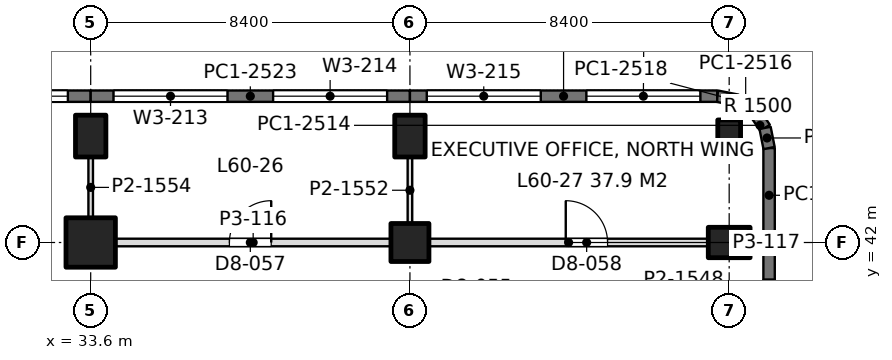
"""IFC4 building model, lengths in metres.
Left out: names, types, materials, properties, quantities, classifications, styles, units other than length and angle.
Written with IfcOpenShell. Run it as: python <this file> out.ifc"""

import sys

from ifc_helpers import new_model, si_unit, direction, frame, frame_2d, origin, origin_2d, place, context, subcontext, project, spatial, rectangle, extrude, element, fill, save


model = new_model("IFC4")
c1 = context("Model", 3, precision=1e-05, world=origin(), true_north=direction((0.0, 1.0)))
c2 = subcontext(c1, "Body", "Model", "MODEL_VIEW")
j1 = project(units=[si_unit("LENGTHUNIT", "METRE"), si_unit("PLANEANGLEUNIT", "RADIAN")], contexts=[c1])
p1 = place(None, origin())
s1 = spatial("IfcSite", under=j1, at=p1, CompositionType="ELEMENT")
p2 = place(p1, origin())
s2 = spatial("IfcBuilding", under=s1, at=p2, CompositionType="ELEMENT")
p3 = place(p2, frame((0.0, 0.0, 263.7)))
s3 = spatial("IfcBuildingStorey", under=s2, at=p3, CompositionType="ELEMENT", Elevation=263.7)
p4 = place(p3, frame((33.6, 42.0, 0.0), z_axis=(0.0, 0.0, 1.0), x_axis=(1.0, 0.0, 0.0)))
e1 = element("IfcColumn", 1, at=p4, inside=s3, PredefinedType="COLUMN", context=c2, shape_type="SweptSolid", body=[
    extrude(rectangle(XDim=1.3, YDim=1.3, at=origin_2d()), origin(), (0.0, 0.0, 1.0), 4.5),
])
p5 = place(p3, frame((33.6, 44.8, 0.0), z_axis=(0.0, 0.0, 1.0), x_axis=(1.0, 0.0, 0.0)))
e2 = element("IfcColumn", 2, at=p5, inside=s3, PredefinedType="COLUMN", context=c2, shape_type="SweptSolid", body=[
    extrude(rectangle(XDim=0.8, YDim=1.1, at=origin_2d()), origin(), (0.0, 0.0, 1.0), 4.5),
])
p6 = place(p3, frame((42.0, 42.0, 0.0), z_axis=(0.0, 0.0, 1.0), x_axis=(1.0, 0.0, 0.0)))
e3 = element("IfcColumn", 3, at=p6, inside=s3, PredefinedType="COLUMN", context=c2, shape_type="SweptSolid", body=[
    extrude(rectangle(XDim=1.0, YDim=1.0, at=origin_2d()), origin(), (0.0, 0.0, 1.0), 4.5),
])
for number, where, z_axis, x_axis in (
    (4, (42.0, 44.8, 0.0), (0.0, 0.0, 1.0), (1.0, 0.0, 0.0)),
    (5, (50.4, 42.0, 0.0), (0.0, 0.0, 1.0), (0.0, 1.0, 0.0)),
):
    element("IfcColumn", number, at=place(p3, frame(where, z_axis=z_axis, x_axis=x_axis)), inside=s3, PredefinedType="COLUMN", context=c2, shape_type="SweptSolid", body=[
        extrude(rectangle(XDim=0.8, YDim=1.1, at=origin_2d()), origin(), (0.0, 0.0, 1.0), 4.5),
    ])
p7 = place(p3, frame((50.4, 44.8, 0.0), z_axis=(0.0, 0.0, 1.0), x_axis=(1.0, 0.0, 0.0)))
e6 = element("IfcColumn", 6, at=p7, inside=s3, PredefinedType="COLUMN", context=c2, shape_type="SweptSolid", body=[
    extrude(rectangle(XDim=0.6, YDim=0.85, at=origin_2d()), origin(), (0.0, 0.0, 1.0), 4.5),
])
p8 = place(p3, frame((25.2, 45.85, 0.0), z_axis=(0.0, 0.0, 1.0), x_axis=(1.0, 0.0, 0.0)))
e7 = element("IfcWall", 7, at=p8, inside=s3, PredefinedType="SOLIDWALL", context=c2, shape_type="SweptSolid", body=[
    extrude(rectangle(XDim=8.4, YDim=0.3, at=frame_2d((4.2, 0.0))), origin(), (0.0, 0.0, 1.0), 4.35),
])
p9 = place(p8, frame((0.6, 0.0, 0.9)))
e8 = element("IfcOpeningElement", 8, at=p9, cuts=e7, PredefinedType="OPENING", context=c2, shape_type="SweptSolid", body=[
    extrude(rectangle(XDim=3.0, YDim=2.4, at=frame_2d((1.5, 1.2))), frame((0.0, 0.16, 0.0), z_axis=(0.0, -1.0, 0.0), x_axis=(1.0, 0.0, 0.0)), (0.0, 0.0, 1.0), 0.32),
])
p10 = place(p8, frame((4.8, 0.0, 0.9)))
e9 = element("IfcOpeningElement", 9, at=p10, cuts=e7, PredefinedType="OPENING", context=c2, shape_type="SweptSolid", body=[
    extrude(rectangle(XDim=3.0, YDim=2.4, at=frame_2d((1.5, 1.2))), frame((0.0, 0.16, 0.0), z_axis=(0.0, -1.0, 0.0), x_axis=(1.0, 0.0, 0.0)), (0.0, 0.0, 1.0), 0.32),
])
p11 = place(p3, frame((33.6, 45.85, 0.0), z_axis=(0.0, 0.0, 1.0), x_axis=(1.0, 0.0, 0.0)))
e10 = element("IfcWall", 10, at=p11, inside=s3, PredefinedType="SOLIDWALL", context=c2, shape_type="SweptSolid", body=[
    extrude(rectangle(XDim=8.4, YDim=0.3, at=frame_2d((4.2, 0.0))), origin(), (0.0, 0.0, 1.0), 4.35),
])
p12 = place(p11, frame((0.6, 0.0, 0.9)))
e11 = element("IfcOpeningElement", 11, at=p12, cuts=e10, PredefinedType="OPENING", context=c2, shape_type="SweptSolid", body=[
    extrude(rectangle(XDim=3.0, YDim=2.4, at=frame_2d((1.5, 1.2))), frame((0.0, 0.16, 0.0), z_axis=(0.0, -1.0, 0.0), x_axis=(1.0, 0.0, 0.0)), (0.0, 0.0, 1.0), 0.32),
])
p13 = place(p11, frame((4.8, 0.0, 0.9)))
e12 = element("IfcOpeningElement", 12, at=p13, cuts=e10, PredefinedType="OPENING", context=c2, shape_type="SweptSolid", body=[
    extrude(rectangle(XDim=3.0, YDim=2.4, at=frame_2d((1.5, 1.2))), frame((0.0, 0.16, 0.0), z_axis=(0.0, -1.0, 0.0), x_axis=(1.0, 0.0, 0.0)), (0.0, 0.0, 1.0), 0.32),
])
p14 = place(p3, frame((42.0, 45.85, 0.0), z_axis=(0.0, 0.0, 1.0), x_axis=(1.0, 0.0, 0.0)))
e13 = element("IfcWall", 13, at=p14, inside=s3, PredefinedType="SOLIDWALL", context=c2, shape_type="SweptSolid", body=[
    extrude(rectangle(XDim=8.085, YDim=0.3, at=frame_2d((4.042, 0.0))), origin(), (0.0, 0.0, 1.0), 4.35),
])
p15 = place(p14, frame((0.443, 0.0, 0.9)))
e14 = element("IfcOpeningElement", 14, at=p15, cuts=e13, PredefinedType="OPENING", context=c2, shape_type="SweptSolid", body=[
    extrude(rectangle(XDim=3.0, YDim=2.4, at=frame_2d((1.5, 1.2))), frame((0.0, 0.16, 0.0), z_axis=(0.0, -1.0, 0.0), x_axis=(1.0, 0.0, 0.0)), (0.0, 0.0, 1.0), 0.32),
])
p16 = place(p14, frame((4.643, 0.0, 0.9)))
e15 = element("IfcOpeningElement", 15, at=p16, cuts=e13, PredefinedType="OPENING", context=c2, shape_type="SweptSolid", body=[
    extrude(rectangle(XDim=3.0, YDim=2.4, at=frame_2d((1.5, 1.2))), frame((0.0, 0.16, 0.0), z_axis=(0.0, -1.0, 0.0), x_axis=(1.0, 0.0, 0.0)), (0.0, 0.0, 1.0), 0.32),
])
p17 = place(p3, frame((50.085, 45.85, 0.0), z_axis=(0.0, 0.0, 1.0), x_axis=(0.980702050465, -0.1955082817, 0.0)))
e16 = element("IfcWall", 16, at=p17, inside=s3, PredefinedType="SOLIDWALL", context=c2, shape_type="SweptSolid", body=[
    extrude(rectangle(XDim=0.541, YDim=0.3, at=frame_2d((0.271, 0.0))), origin(), (0.0, 0.0, 1.0), 4.35),
])
p18 = place(p3, frame((50.615, 45.744, 0.0), z_axis=(0.0, 0.0, 1.0), x_axis=(0.831692711774, -0.555236195849, 0.0)))
e17 = element("IfcWall", 17, at=p18, inside=s3, PredefinedType="SOLIDWALL", context=c2, shape_type="SweptSolid", body=[
    extrude(rectangle(XDim=0.525, YDim=0.3, at=frame_2d((0.263, 0.0))), origin(), (0.0, 0.0, 1.0), 4.35),
])
p19 = place(p3, frame((51.052, 45.453, 0.0), z_axis=(0.0, 0.0, 1.0), x_axis=(0.55534295404, -0.831621430339, 0.0)))
e18 = element("IfcWall", 18, at=p19, inside=s3, PredefinedType="SOLIDWALL", context=c2, shape_type="SweptSolid", body=[
    extrude(rectangle(XDim=0.526, YDim=0.3, at=frame_2d((0.263, 0.0))), origin(), (0.0, 0.0, 1.0), 4.35),
])
p20 = place(p3, frame((51.344, 45.015, 0.0), z_axis=(0.0, 0.0, 1.0), x_axis=(0.195073962632, -0.980788534345, 0.0)))
e19 = element("IfcWall", 19, at=p20, inside=s3, PredefinedType="SOLIDWALL", context=c2, shape_type="SweptSolid", body=[
    extrude(rectangle(XDim=0.541, YDim=0.3, at=frame_2d((0.271, 0.0))), origin(), (0.0, 0.0, 1.0), 4.35),
])
p21 = place(p3, frame((51.45, 44.485, 0.0), z_axis=(0.0, 0.0, 1.0), x_axis=(0.0, -1.0, 0.0)))
e20 = element("IfcWall", 20, at=p21, inside=s3, PredefinedType="SOLIDWALL", context=c2, shape_type="SweptSolid", body=[
    extrude(rectangle(XDim=2.485, YDim=0.3, at=frame_2d((1.243, 0.0))), origin(), (0.0, 0.0, 1.0), 4.35),
])
p22 = place(p3, frame((51.45, 42.0, 0.0), z_axis=(0.0, 0.0, 1.0), x_axis=(0.0, -1.0, 0.0)))
e21 = element("IfcWall", 21, at=p22, inside=s3, PredefinedType="SOLIDWALL", context=c2, shape_type="SweptSolid", body=[
    extrude(rectangle(XDim=4.35, YDim=0.3, at=frame_2d((2.175, 0.0))), origin(), (0.0, 0.0, 1.0), 4.35),
])
p23 = place(p22, frame((0.975, 0.0, 0.9)))
e22 = element("IfcOpeningElement", 22, at=p23, cuts=e21, PredefinedType="OPENING", context=c2, shape_type="SweptSolid", body=[
    extrude(rectangle(XDim=2.4, YDim=1.9, at=frame_2d((1.2, 0.95))), frame((0.0, 0.16, 0.0), z_axis=(0.0, -1.0, 0.0), x_axis=(1.0, 0.0, 0.0)), (0.0, 0.0, 1.0), 0.32),
])
p24 = place(p3, frame((34.249, 42.0, 0.0), z_axis=(0.0, 0.0, 1.0), x_axis=(1.0, 0.0, 0.0)))
e23 = element("IfcWall", 23, at=p24, inside=s3, PredefinedType="PARTITIONING", context=c2, shape_type="SweptSolid", body=[
    extrude(rectangle(XDim=7.252, YDim=0.2, at=frame_2d((3.626, 0.0))), origin(), (0.0, 0.0, 1.0), 3.8),
])
p25 = place(p24, frame((3.001, 0.0, 0.0)))
e24 = element("IfcOpeningElement", 24, at=p25, cuts=e23, PredefinedType="OPENING", context=c2, shape_type="SweptSolid", body=[
    extrude(rectangle(XDim=1.1, YDim=2.4, at=frame_2d((0.55, 1.2))), frame((0.0, 0.11, 0.0), z_axis=(0.0, -1.0, 0.0), x_axis=(1.0, 0.0, 0.0)), (0.0, 0.0, 1.0), 0.22),
])
p26 = place(p3, frame((42.499, 42.0, 0.0), z_axis=(0.0, 0.0, 1.0), x_axis=(1.0, 0.0, 0.0)))
e25 = element("IfcWall", 25, at=p26, inside=s3, PredefinedType="PARTITIONING", context=c2, shape_type="SweptSolid", body=[
    extrude(rectangle(XDim=7.352, YDim=0.2, at=frame_2d((3.676, 0.0))), origin(), (0.0, 0.0, 1.0), 3.8),
])
p27 = place(p26, frame((3.601, 0.0, 0.0)))
e26 = element("IfcOpeningElement", 26, at=p27, cuts=e25, PredefinedType="OPENING", context=c2, shape_type="SweptSolid", body=[
    extrude(rectangle(XDim=1.1, YDim=2.4, at=frame_2d((0.55, 1.2))), frame((0.0, 0.11, 0.0), z_axis=(0.0, -1.0, 0.0), x_axis=(1.0, 0.0, 0.0)), (0.0, 0.0, 1.0), 0.22),
])
p28 = place(p3, frame((33.6, 42.649, 0.0), z_axis=(0.0, 0.0, 1.0), x_axis=(0.0, 1.0, 0.0)))
e27 = element("IfcWall", 27, at=p28, inside=s3, PredefinedType="PARTITIONING", context=c2, shape_type="SweptSolid", body=[
    extrude(rectangle(XDim=1.602, YDim=0.12, at=frame_2d((0.801, 0.0))), origin(), (0.0, 0.0, 1.0), 3.99),
])
p29 = place(p3, frame((42.0, 42.499, 0.0), z_axis=(0.0, 0.0, 1.0), x_axis=(0.0, 1.0, 0.0)))
e28 = element("IfcWall", 28, at=p29, inside=s3, PredefinedType="PARTITIONING", context=c2, shape_type="SweptSolid", body=[
    extrude(rectangle(XDim=1.752, YDim=0.12, at=frame_2d((0.876, 0.0))), origin(), (0.0, 0.0, 1.0), 3.99),
])
p30 = place(p10, origin())
e29 = element("IfcWindow", 29, at=p30, inside=s3, PartitioningType="SINGLE_PANEL", PredefinedType="WINDOW", context=c2, shape_type="SweptSolid", body=[
    extrude(rectangle(XDim=3.0, YDim=2.4, at=frame_2d((1.5, 1.2))), frame((0.0, 0.03, 0.0), z_axis=(0.0, -1.0, 0.0), x_axis=(1.0, 0.0, 0.0)), (0.0, 0.0, 1.0), 0.06),
])
fill(e9, e29)
p31 = place(p12, origin())
e30 = element("IfcWindow", 30, at=p31, inside=s3, PartitioningType="SINGLE_PANEL", PredefinedType="WINDOW", context=c2, shape_type="SweptSolid", body=[
    extrude(rectangle(XDim=3.0, YDim=2.4, at=frame_2d((1.5, 1.2))), frame((0.0, 0.03, 0.0), z_axis=(0.0, -1.0, 0.0), x_axis=(1.0, 0.0, 0.0)), (0.0, 0.0, 1.0), 0.06),
])
fill(e11, e30)
p32 = place(p13, origin())
e31 = element("IfcWindow", 31, at=p32, inside=s3, PartitioningType="SINGLE_PANEL", PredefinedType="WINDOW", context=c2, shape_type="SweptSolid", body=[
    extrude(rectangle(XDim=3.0, YDim=2.4, at=frame_2d((1.5, 1.2))), frame((0.0, 0.03, 0.0), z_axis=(0.0, -1.0, 0.0), x_axis=(1.0, 0.0, 0.0)), (0.0, 0.0, 1.0), 0.06),
])
fill(e12, e31)
p33 = place(p15, origin())
e32 = element("IfcWindow", 32, at=p33, inside=s3, PartitioningType="SINGLE_PANEL", PredefinedType="WINDOW", context=c2, shape_type="SweptSolid", body=[
    extrude(rectangle(XDim=3.0, YDim=2.4, at=frame_2d((1.5, 1.2))), frame((0.0, 0.03, 0.0), z_axis=(0.0, -1.0, 0.0), x_axis=(1.0, 0.0, 0.0)), (0.0, 0.0, 1.0), 0.06),
])
fill(e14, e32)
p34 = place(p16, origin())
e33 = element("IfcWindow", 33, at=p34, inside=s3, PartitioningType="SINGLE_PANEL", PredefinedType="WINDOW", context=c2, shape_type="SweptSolid", body=[
    extrude(rectangle(XDim=3.0, YDim=2.4, at=frame_2d((1.5, 1.2))), frame((0.0, 0.03, 0.0), z_axis=(0.0, -1.0, 0.0), x_axis=(1.0, 0.0, 0.0)), (0.0, 0.0, 1.0), 0.06),
])
fill(e15, e33)
p35 = place(p23, origin())
e34 = element("IfcWindow", 34, at=p35, inside=s3, PartitioningType="SINGLE_PANEL", PredefinedType="WINDOW", context=c2, shape_type="SweptSolid", body=[
    extrude(rectangle(XDim=2.4, YDim=1.9, at=frame_2d((1.2, 0.95))), frame((0.0, 0.03, 0.0), z_axis=(0.0, -1.0, 0.0), x_axis=(1.0, 0.0, 0.0)), (0.0, 0.0, 1.0), 0.06),
])
fill(e22, e34)
p36 = place(p25, origin())
e35 = element("IfcDoor", 35, at=p36, inside=s3, OperationType="SINGLE_SWING_RIGHT", PredefinedType="DOOR", context=c2, shape_type="SweptSolid", body=[
    extrude(rectangle(XDim=1.1, YDim=2.4, at=frame_2d((0.55, 1.2))), frame((0.0, 0.025, 0.0), z_axis=(0.0, -1.0, 0.0), x_axis=(1.0, 0.0, 0.0)), (0.0, 0.0, 1.0), 0.05),
])
fill(e24, e35)
p37 = place(p27, origin())
e36 = element("IfcDoor", 36, at=p37, inside=s3, OperationType="SINGLE_SWING_LEFT", PredefinedType="DOOR", context=c2, shape_type="SweptSolid", body=[
    extrude(rectangle(XDim=1.1, YDim=2.4, at=frame_2d((0.55, 1.2))), frame((0.0, 0.025, 0.0), z_axis=(0.0, -1.0, 0.0), x_axis=(1.0, 0.0, 0.0)), (0.0, 0.0, 1.0), 0.05),
])
fill(e26, e36)
save(model, sys.argv[1])
